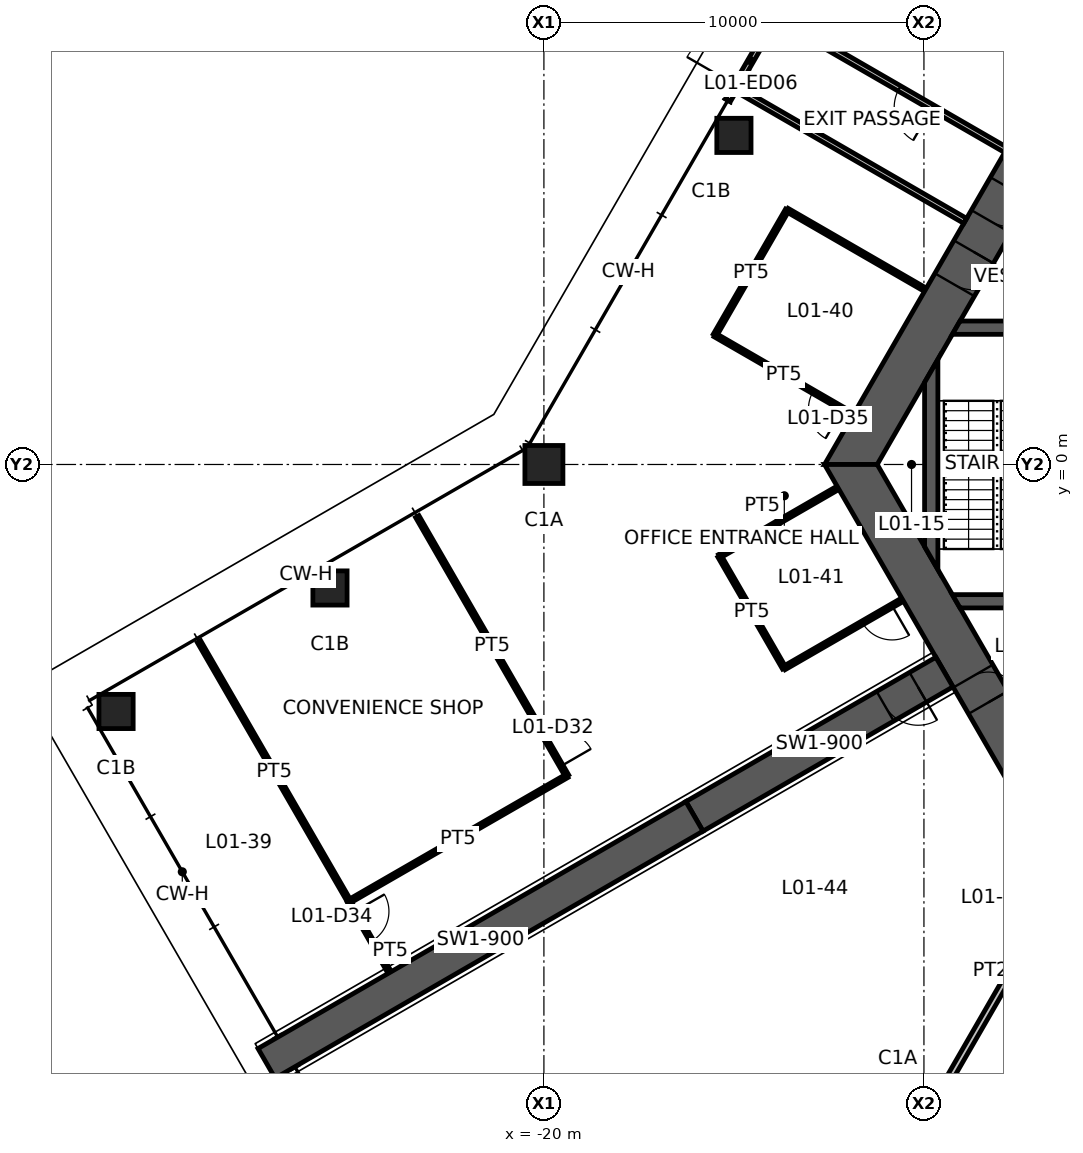
"""IFC4 building model, lengths in metres.
Left out: names, types, materials, properties, quantities, classifications, styles, units other than length and angle.
Written with IfcOpenShell. Run it as: python <this file> out.ifc"""

import sys

from ifc_helpers import new_model, si_unit, direction, frame, frame_2d, origin, origin_2d, place, context, subcontext, project, spatial, polyline, rectangle, hollow_rectangle, outline, extrude, element, fill, save


model = new_model("IFC4")
c1 = context("Model", 3, precision=1e-05, world=origin(), true_north=direction((0.0, 1.0)))
c2 = subcontext(c1, "Body", "Model", "MODEL_VIEW")
j1 = project(units=[si_unit("LENGTHUNIT", "METRE"), si_unit("PLANEANGLEUNIT", "RADIAN")], contexts=[c1])
p1 = place(None, origin())
s1 = spatial("IfcSite", under=j1, at=p1, CompositionType="ELEMENT")
p2 = place(p1, origin())
s2 = spatial("IfcBuilding", under=s1, at=p2, CompositionType="ELEMENT")
p3 = place(p2, origin())
s3 = spatial("IfcBuildingStorey", under=s2, at=p3, CompositionType="ELEMENT", Elevation=0.0)
p4 = place(p3, frame((-20.0, 0.0, 0.0), z_axis=(0.0, 0.0, 1.0), x_axis=(1.0, 0.0, 0.0)))
e1 = element("IfcColumn", 1, at=p4, inside=s3, PredefinedType="COLUMN", context=c2, shape_type="SweptSolid", body=[
    extrude(hollow_rectangle(XDim=1.0, YDim=1.0, WallThickness=0.06, at=origin_2d()), origin(), (0.0, 0.0, 1.0), 5.5),
])
for number, where, z_axis, x_axis in (
    (2, (-15.0, 8.66, 0.0), (0.0, 0.0, 1.0), (1.0, 0.0, 0.0)),
    (3, (-25.629, -3.25, 0.0), (0.0, 0.0, 1.0), (1.0, 0.0, 0.0)),
    (4, (-31.258, -6.5, 0.0), (0.0, 0.0, 1.0), (1.0, 0.0, 0.0)),
):
    element("IfcColumn", number, at=place(p3, frame(where, z_axis=z_axis, x_axis=x_axis)), inside=s3, PredefinedType="COLUMN", context=c2, shape_type="SweptSolid", body=[
        extrude(hollow_rectangle(XDim=0.9, YDim=0.9, WallThickness=0.05, at=origin_2d()), origin(), (0.0, 0.0, 1.0), 5.5),
    ])
p5 = place(p3, frame((-5.961, 10.325, 0.0), z_axis=(0.0, 0.0, 1.0), x_axis=(-0.500004296715, -0.866022923061, 0.0)))
e5 = element("IfcWall", 5, at=p5, inside=s3, PredefinedType="SHEAR", context=c2, shape_type="SweptSolid", body=[
    extrude(outline(polyline([(-0.346, -0.6), (3.541, -0.6), (4.541, -0.6), (5.461, -0.6), (6.461, -0.6), (12.269, -0.6), (11.576, 0.6), (6.461, 0.6), (5.461, 0.6), (4.541, 0.6), (3.541, 0.6), (0.346, 0.6), (-0.346, -0.6)])), origin(), (0.0, 0.0, 1.0), 5.5),
])
p6 = place(p5, frame((3.541, 0.0, 0.0)))
e6 = element("IfcOpeningElement", 6, at=p6, cuts=e5, PredefinedType="OPENING", context=c2, shape_type="SweptSolid", body=[
    extrude(rectangle(XDim=1.0, YDim=2.1, at=frame_2d((0.5, 1.05))), frame((0.0, 0.61, 0.0), z_axis=(0.0, -1.0, 0.0), x_axis=(1.0, 0.0, 0.0)), (0.0, 0.0, 1.0), 1.22),
])
p7 = place(p5, frame((5.461, 0.0, 0.0)))
e7 = element("IfcOpeningElement", 7, at=p7, cuts=e5, PredefinedType="OPENING", context=c2, shape_type="SweptSolid", body=[
    extrude(rectangle(XDim=1.0, YDim=2.1, at=frame_2d((0.5, 1.05))), frame((0.0, 0.61, 0.0), z_axis=(0.0, -1.0, 0.0), x_axis=(1.0, 0.0, 0.0)), (0.0, 0.0, 1.0), 1.22),
])
p8 = place(p3, frame((-11.922, 0.0, 0.0), z_axis=(0.0, 0.0, 1.0), x_axis=(0.500004296715, -0.866022923061, 0.0)))
e8 = element("IfcWall", 8, at=p8, inside=s3, PredefinedType="SHEAR", context=c2, shape_type="SweptSolid", body=[
    extrude(outline(polyline([(-0.346, -0.6), (6.431, -0.6), (7.231, -0.6), (12.269, -0.6), (11.576, 0.6), (7.231, 0.6), (6.431, 0.6), (0.346, 0.6), (-0.346, -0.6)])), origin(), (0.0, 0.0, 1.0), 5.5),
])
p9 = place(p8, frame((6.431, 0.0, 0.0)))
e9 = element("IfcOpeningElement", 9, at=p9, cuts=e8, PredefinedType="OPENING", context=c2, shape_type="SweptSolid", body=[
    extrude(rectangle(XDim=0.8, YDim=2.1, at=frame_2d((0.4, 1.05))), frame((0.0, 0.61, 0.0), z_axis=(0.0, -1.0, 0.0), x_axis=(1.0, 0.0, 0.0)), (0.0, 0.0, 1.0), 1.22),
])
p10 = place(p3, frame((-9.461, -5.462, 0.0), z_axis=(0.0, 0.0, 1.0), x_axis=(-0.866019116917, -0.500010889016, 0.0)))
e10 = element("IfcWall", 10, at=p10, inside=s3, PredefinedType="SHEAR", context=c2, shape_type="SweptSolid", body=[
    extrude(rectangle(XDim=7.595, YDim=0.9, at=frame_2d((3.798, 0.0))), origin(), (0.0, 0.0, 1.0), 5.5),
])
p11 = place(p10, frame((0.8, 0.0, 0.0)))
e11 = element("IfcOpeningElement", 11, at=p11, cuts=e10, PredefinedType="OPENING", context=c2, shape_type="SweptSolid", body=[
    extrude(rectangle(XDim=1.0, YDim=2.1, at=frame_2d((0.5, 1.05))), frame((0.0, 0.46, 0.0), z_axis=(0.0, -1.0, 0.0), x_axis=(1.0, 0.0, 0.0)), (0.0, 0.0, 1.0), 0.92),
])
p12 = place(p3, frame((-16.039, -9.26, 0.0), z_axis=(0.0, 0.0, 1.0), x_axis=(-0.866024837091, -0.50000098154, 0.0)))
e12 = element("IfcWall", 12, at=p12, inside=s3, PredefinedType="SHEAR", context=c2, shape_type="SweptSolid", body=[
    extrude(rectangle(XDim=13.0, YDim=0.9, at=frame_2d((6.5, 0.0))), origin(), (0.0, 0.0, 1.0), 5.5),
])
p13 = place(p3, frame((-15.16, 9.584, 0.0), z_axis=(0.0, 0.0, 1.0), x_axis=(0.499957262057, 0.866050077142, 0.0)))
e13 = element("IfcWall", 13, at=p13, inside=s3, PredefinedType="STANDARD", context=c2, shape_type="SweptSolid", body=[
    extrude(rectangle(XDim=2.4, YDim=0.15, at=frame_2d((1.2, 0.0))), origin(), (0.0, 0.0, 1.0), 5.5),
])
p14 = place(p13, frame((0.45, 0.0, 0.0)))
e14 = element("IfcOpeningElement", 14, at=p14, cuts=e13, PredefinedType="OPENING", context=c2, shape_type="SweptSolid", body=[
    extrude(rectangle(XDim=1.5, YDim=2.4, at=frame_2d((0.75, 1.2))), frame((0.0, 0.085, 0.0), z_axis=(0.0, -1.0, 0.0), x_axis=(1.0, 0.0, 0.0)), (0.0, 0.0, 1.0), 0.17),
])
p15 = place(p3, frame((-9.151, 3.6, 0.0), z_axis=(0.0, 0.0, 1.0), x_axis=(1.0, 0.0, 0.0)))
e15 = element("IfcWall", 15, at=p15, inside=s3, PredefinedType="SHEAR", context=c2, shape_type="SweptSolid", body=[
    extrude(outline(polyline([(-0.101, -0.175), (3.151, -0.175), (4.151, -0.175), (5.551, -0.175), (6.651, -0.175), (7.726, -0.175), (7.726, 0.175), (6.651, 0.175), (5.551, 0.175), (4.151, 0.175), (3.151, 0.175), (0.101, 0.175), (-0.101, -0.175)])), origin(), (0.0, 0.0, 1.0), 5.5),
])
p16 = place(p15, frame((3.151, 0.0, 0.0)))
e16 = element("IfcOpeningElement", 16, at=p16, cuts=e15, PredefinedType="OPENING", context=c2, shape_type="SweptSolid", body=[
    extrude(rectangle(XDim=1.0, YDim=2.1, at=frame_2d((0.5, 1.05))), frame((0.0, 0.185, 0.0), z_axis=(0.0, -1.0, 0.0), x_axis=(1.0, 0.0, 0.0)), (0.0, 0.0, 1.0), 0.37),
])
p17 = place(p15, frame((5.551, 0.0, 0.0)))
e17 = element("IfcOpeningElement", 17, at=p17, cuts=e15, PredefinedType="OPENING", context=c2, shape_type="SweptSolid", body=[
    extrude(rectangle(XDim=1.1, YDim=2.1, at=frame_2d((0.55, 1.05))), frame((0.0, 0.185, 0.0), z_axis=(0.0, -1.0, 0.0), x_axis=(1.0, 0.0, 0.0)), (0.0, 0.0, 1.0), 0.37),
])
p18 = place(p3, frame((-9.151, -3.6, 0.0), z_axis=(0.0, 0.0, 1.0), x_axis=(1.0, 0.0, 0.0)))
e18 = element("IfcWall", 18, at=p18, inside=s3, PredefinedType="SHEAR", context=c2, shape_type="SweptSolid", body=[
    extrude(outline(polyline([(0.101, -0.175), (3.001, -0.175), (4.301, -0.175), (5.551, -0.175), (6.651, -0.175), (7.726, -0.175), (7.726, 0.175), (6.651, 0.175), (5.551, 0.175), (4.301, 0.175), (3.001, 0.175), (-0.101, 0.175), (0.101, -0.175)])), origin(), (0.0, 0.0, 1.0), 5.5),
])
p19 = place(p18, frame((5.551, 0.0, 0.0)))
e19 = element("IfcOpeningElement", 19, at=p19, cuts=e18, PredefinedType="OPENING", context=c2, shape_type="SweptSolid", body=[
    extrude(rectangle(XDim=1.1, YDim=2.1, at=frame_2d((0.55, 1.05))), frame((0.0, 0.185, 0.0), z_axis=(0.0, -1.0, 0.0), x_axis=(1.0, 0.0, 0.0)), (0.0, 0.0, 1.0), 0.37),
])
p20 = place(p18, frame((3.001, 0.0, 0.0)))
e20 = element("IfcOpeningElement", 20, at=p20, cuts=e18, PredefinedType="OPENING", context=c2, shape_type="SweptSolid", body=[
    extrude(rectangle(XDim=1.3, YDim=2.1, at=frame_2d((0.65, 1.05))), frame((0.0, 0.185, 0.0), z_axis=(0.0, -1.0, 0.0), x_axis=(1.0, 0.0, 0.0)), (0.0, 0.0, 1.0), 0.37),
])
p21 = place(p3, frame((-9.808, -2.462, 0.0), z_axis=(0.0, 0.0, 1.0), x_axis=(0.0, 1.0, 0.0)))
e21 = element("IfcWall", 21, at=p21, inside=s3, PredefinedType="SHEAR", context=c2, shape_type="SweptSolid", body=[
    extrude(outline(polyline([(-0.303, -0.175), (5.228, -0.175), (4.621, 0.175), (0.303, 0.175), (-0.303, -0.175)])), origin(), (0.0, 0.0, 1.0), 5.5),
])
p22 = place(p3, frame((-6.035, 10.453, 0.0), z_axis=(0.0, 0.0, 1.0), x_axis=(-0.499993402427, 0.866029212861, 0.0)))
e22 = element("IfcWall", 22, at=p22, inside=s3, PredefinedType="PARTITIONING", context=c2, shape_type="SweptSolid", body=[
    extrude(outline(polyline([(-0.051, -0.087), (1.129, -0.087), (2.129, -0.087), (7.93, -0.087), (7.93, 0.087), (2.129, 0.087), (1.129, 0.087), (0.051, 0.087), (-0.051, -0.087)])), origin(), (0.0, 0.0, 1.0), 4.6),
])
p23 = place(p22, frame((1.129, 0.0, 0.0)))
e23 = element("IfcOpeningElement", 23, at=p23, cuts=e22, PredefinedType="OPENING", context=c2, shape_type="SweptSolid", body=[
    extrude(rectangle(XDim=1.0, YDim=2.1, at=frame_2d((0.5, 1.05))), frame((0.0, 0.098, 0.0), z_axis=(0.0, -1.0, 0.0), x_axis=(1.0, 0.0, 0.0)), (0.0, 0.0, 1.0), 0.195),
])
p24 = place(p3, frame((-6.035, -10.453, 0.0), z_axis=(0.0, 0.0, 1.0), x_axis=(-0.499993402427, -0.866029212861, 0.0)))
e24 = element("IfcWall", 24, at=p24, inside=s3, PredefinedType="PARTITIONING", context=c2, shape_type="SweptSolid", body=[
    extrude(outline(polyline([(-0.051, -0.087), (1.129, -0.087), (2.129, -0.087), (7.93, -0.087), (7.93, 0.087), (2.129, 0.087), (1.129, 0.087), (0.051, 0.087), (-0.051, -0.087)])), origin(), (0.0, 0.0, 1.0), 4.6),
])
p25 = place(p24, frame((1.129, 0.0, 0.0)))
e25 = element("IfcOpeningElement", 25, at=p25, cuts=e24, PredefinedType="OPENING", context=c2, shape_type="SweptSolid", body=[
    extrude(rectangle(XDim=1.0, YDim=2.1, at=frame_2d((0.5, 1.05))), frame((0.0, 0.098, 0.0), z_axis=(0.0, -1.0, 0.0), x_axis=(1.0, 0.0, 0.0)), (0.0, 0.0, 1.0), 0.195),
])
p26 = place(p3, frame((-25.12, -11.501, 0.0), z_axis=(0.0, 0.0, 1.0), x_axis=(-0.50060862307, 0.865673729825, 0.0)))
e26 = element("IfcWall", 26, at=p26, inside=s3, PredefinedType="PARTITIONING", context=c2, shape_type="SweptSolid", body=[
    extrude(rectangle(XDim=7.9, YDim=0.1, at=frame_2d((3.95, 0.0))), origin(), (0.0, 0.0, 1.0), 4.5),
])
p27 = place(p3, frame((-23.332, -1.37, 0.0), z_axis=(0.0, 0.0, 1.0), x_axis=(0.500021035396, -0.866013258652, 0.0)))
e27 = element("IfcWall", 27, at=p27, inside=s3, PredefinedType="PARTITIONING", context=c2, shape_type="SweptSolid", body=[
    extrude(rectangle(XDim=7.88, YDim=0.1, at=frame_2d((3.94, 0.0))), origin(), (0.0, 0.0, 1.0), 4.5),
])
p28 = place(p27, frame((6.68, 0.0, 0.0)))
e28 = element("IfcOpeningElement", 28, at=p28, cuts=e27, PredefinedType="OPENING", context=c2, shape_type="SweptSolid", body=[
    extrude(rectangle(XDim=0.9, YDim=2.1, at=frame_2d((0.45, 1.05))), frame((0.0, 0.06, 0.0), z_axis=(0.0, -1.0, 0.0), x_axis=(1.0, 0.0, 0.0)), (0.0, 0.0, 1.0), 0.12),
])
p29 = place(p3, frame((-19.392, -8.194, 0.0), z_axis=(0.0, 0.0, 1.0), x_axis=(-0.866327998015, -0.499475524781, 0.0)))
e29 = element("IfcWall", 29, at=p29, inside=s3, PredefinedType="PARTITIONING", context=c2, shape_type="SweptSolid", body=[
    extrude(rectangle(XDim=6.62, YDim=0.1, at=frame_2d((3.31, 0.0))), origin(), (0.0, 0.0, 1.0), 4.5),
])
p30 = place(p3, frame((-7.838, 8.274, 0.0), z_axis=(0.0, 0.0, 1.0), x_axis=(-0.866012988868, 0.50002150265, 0.0)))
e30 = element("IfcWall", 30, at=p30, inside=s3, PredefinedType="PARTITIONING", context=c2, shape_type="SweptSolid", body=[
    extrude(rectangle(XDim=6.926, YDim=0.15, at=frame_2d((3.463, 0.0))), origin(), (0.0, 0.0, 1.0), 4.5),
])
p31 = place(p30, frame((2.246, 0.0, 0.0)))
e31 = element("IfcOpeningElement", 31, at=p31, cuts=e30, PredefinedType="OPENING", context=c2, shape_type="SweptSolid", body=[
    extrude(rectangle(XDim=1.0, YDim=2.1, at=frame_2d((0.5, 1.05))), frame((0.0, 0.085, 0.0), z_axis=(0.0, -1.0, 0.0), x_axis=(1.0, 0.0, 0.0)), (0.0, 0.0, 1.0), 0.17),
])
p32 = place(p3, frame((-8.914, 6.411, 0.0), z_axis=(0.0, 0.0, 1.0), x_axis=(-0.866025337903, 0.500000114109, 0.0)))
e32 = element("IfcWall", 32, at=p32, inside=s3, PredefinedType="PARTITIONING", context=c2, shape_type="SweptSolid", body=[
    extrude(rectangle(XDim=6.875, YDim=0.15, at=frame_2d((3.438, 0.0))), origin(), (0.0, 0.0, 1.0), 4.5),
])
p33 = place(p3, frame((-25.126, -11.5, 0.0), z_axis=(0.0, 0.0, 1.0), x_axis=(0.496175899628, -0.868222020354, 0.0)))
e33 = element("IfcWall", 33, at=p33, inside=s3, PredefinedType="PARTITIONING", context=c2, shape_type="SweptSolid", body=[
    extrude(rectangle(XDim=2.134, YDim=0.1, at=frame_2d((1.067, 0.0))), origin(), (0.0, 0.0, 1.0), 4.5),
])
p34 = place(p33, frame((0.3, 0.0, 0.0)))
e34 = element("IfcOpeningElement", 34, at=p34, cuts=e33, PredefinedType="OPENING", context=c2, shape_type="SweptSolid", body=[
    extrude(rectangle(XDim=0.9, YDim=2.1, at=frame_2d((0.45, 1.05))), frame((0.0, 0.06, 0.0), z_axis=(0.0, -1.0, 0.0), x_axis=(1.0, 0.0, 0.0)), (0.0, 0.0, 1.0), 0.12),
])
p35 = place(p3, frame((-15.499, 3.406, 0.0), z_axis=(0.0, 0.0, 1.0), x_axis=(0.499967155389, 0.866044365799, 0.0)))
e35 = element("IfcWall", 35, at=p35, inside=s3, PredefinedType="PARTITIONING", context=c2, shape_type="SweptSolid", body=[
    extrude(rectangle(XDim=3.8, YDim=0.1, at=frame_2d((1.9, 0.0))), origin(), (0.0, 0.0, 1.0), 4.5),
])
p36 = place(p3, frame((-13.599, 6.697, 0.0), z_axis=(0.0, 0.0, 1.0), x_axis=(0.866024134012, -0.500002199304, 0.0)))
e36 = element("IfcWall", 36, at=p36, inside=s3, PredefinedType="PARTITIONING", context=c2, shape_type="SweptSolid", body=[
    extrude(rectangle(XDim=4.18, YDim=0.1, at=frame_2d((2.09, 0.0))), origin(), (0.0, 0.0, 1.0), 4.5),
])
p37 = place(p3, frame((-11.879, 1.316, 0.0), z_axis=(0.0, 0.0, 1.0), x_axis=(-0.866034823405, 0.499983684383, 0.0)))
e37 = element("IfcWall", 37, at=p37, inside=s3, PredefinedType="PARTITIONING", context=c2, shape_type="SweptSolid", body=[
    extrude(rectangle(XDim=4.18, YDim=0.1, at=frame_2d((2.09, 0.0))), origin(), (0.0, 0.0, 1.0), 4.5),
])
p38 = place(p37, frame((0.3, 0.0, 0.0)))
e38 = element("IfcOpeningElement", 38, at=p38, cuts=e37, PredefinedType="OPENING", context=c2, shape_type="SweptSolid", body=[
    extrude(rectangle(XDim=0.9, YDim=2.1, at=frame_2d((0.45, 1.05))), frame((0.0, 0.06, 0.0), z_axis=(0.0, -1.0, 0.0), x_axis=(1.0, 0.0, 0.0)), (0.0, 0.0, 1.0), 0.12),
])
p39 = place(p3, frame((-15.379, -2.413, 0.0), z_axis=(0.0, 0.0, 1.0), x_axis=(0.866018643436, 0.500011709085, 0.0)))
e39 = element("IfcWall", 39, at=p39, inside=s3, PredefinedType="PARTITIONING", context=c2, shape_type="SweptSolid", body=[
    extrude(rectangle(XDim=3.58, YDim=0.1, at=frame_2d((1.79, 0.0))), origin(), (0.0, 0.0, 1.0), 4.5),
])
p40 = place(p3, frame((-13.679, -5.357, 0.0), z_axis=(0.0, 0.0, 1.0), x_axis=(-0.500008388397, 0.866020560687, 0.0)))
e40 = element("IfcWall", 40, at=p40, inside=s3, PredefinedType="PARTITIONING", context=c2, shape_type="SweptSolid", body=[
    extrude(rectangle(XDim=3.4, YDim=0.1, at=frame_2d((1.7, 0.0))), origin(), (0.0, 0.0, 1.0), 4.5),
])
p41 = place(p3, frame((-10.579, -3.567, 0.0), z_axis=(0.0, 0.0, 1.0), x_axis=(-0.866018643436, -0.500011709085, 0.0)))
e41 = element("IfcWall", 41, at=p41, inside=s3, PredefinedType="PARTITIONING", context=c2, shape_type="SweptSolid", body=[
    extrude(rectangle(XDim=3.58, YDim=0.1, at=frame_2d((1.79, 0.0))), origin(), (0.0, 0.0, 1.0), 4.5),
])
p42 = place(p41, frame((0.3, 0.0, 0.0)))
e42 = element("IfcOpeningElement", 42, at=p42, cuts=e41, PredefinedType="OPENING", context=c2, shape_type="SweptSolid", body=[
    extrude(rectangle(XDim=0.9, YDim=2.1, at=frame_2d((0.45, 1.05))), frame((0.0, 0.06, 0.0), z_axis=(0.0, -1.0, 0.0), x_axis=(1.0, 0.0, 0.0)), (0.0, 0.0, 1.0), 0.12),
])
p43 = place(p14, origin())
e43 = element("IfcDoor", 43, at=p43, inside=s3, OperationType="DOUBLE_DOOR_SINGLE_SWING", PredefinedType="DOOR", context=c2, shape_type="SweptSolid", body=[
    extrude(rectangle(XDim=1.5, YDim=2.4, at=frame_2d((0.75, 1.2))), frame((0.0, 0.025, 0.0), z_axis=(0.0, -1.0, 0.0), x_axis=(1.0, 0.0, 0.0)), (0.0, 0.0, 1.0), 0.05),
])
fill(e14, e43)
p44 = place(p9, origin())
e44 = element("IfcDoor", 44, at=p44, inside=s3, OperationType="SINGLE_SWING_RIGHT", PredefinedType="DOOR", context=c2, shape_type="SweptSolid", body=[
    extrude(rectangle(XDim=0.8, YDim=2.1, at=frame_2d((0.4, 1.05))), frame((0.0, 0.025, 0.0), z_axis=(0.0, -1.0, 0.0), x_axis=(1.0, 0.0, 0.0)), (0.0, 0.0, 1.0), 0.05),
])
fill(e9, e44)
p45 = place(p6, origin())
e45 = element("IfcDoor", 45, at=p45, inside=s3, OperationType="SINGLE_SWING_LEFT", PredefinedType="DOOR", context=c2, shape_type="SweptSolid", body=[
    extrude(rectangle(XDim=1.0, YDim=2.1, at=frame_2d((0.5, 1.05))), frame((0.0, 0.025, 0.0), z_axis=(0.0, -1.0, 0.0), x_axis=(1.0, 0.0, 0.0)), (0.0, 0.0, 1.0), 0.05),
])
fill(e6, e45)
p46 = place(p11, origin())
e46 = element("IfcDoor", 46, at=p46, inside=s3, OperationType="SINGLE_SWING_LEFT", PredefinedType="DOOR", context=c2, shape_type="SweptSolid", body=[
    extrude(rectangle(XDim=1.0, YDim=2.1, at=frame_2d((0.5, 1.05))), frame((0.0, 0.025, 0.0), z_axis=(0.0, -1.0, 0.0), x_axis=(1.0, 0.0, 0.0)), (0.0, 0.0, 1.0), 0.05),
])
fill(e11, e46)
p47 = place(p28, origin())
e47 = element("IfcDoor", 47, at=p47, inside=s3, OperationType="SINGLE_SWING_RIGHT", PredefinedType="DOOR", context=c2, shape_type="SweptSolid", body=[
    extrude(rectangle(XDim=0.9, YDim=2.1, at=frame_2d((0.45, 1.05))), frame((0.0, 0.025, 0.0), z_axis=(0.0, -1.0, 0.0), x_axis=(1.0, 0.0, 0.0)), (0.0, 0.0, 1.0), 0.05),
])
fill(e28, e47)
p48 = place(p31, origin())
e48 = element("IfcDoor", 48, at=p48, inside=s3, OperationType="SINGLE_SWING_LEFT", PredefinedType="DOOR", context=c2, shape_type="SweptSolid", body=[
    extrude(rectangle(XDim=1.0, YDim=2.1, at=frame_2d((0.5, 1.05))), frame((0.0, 0.025, 0.0), z_axis=(0.0, -1.0, 0.0), x_axis=(1.0, 0.0, 0.0)), (0.0, 0.0, 1.0), 0.05),
])
fill(e31, e48)
p49 = place(p34, origin())
e49 = element("IfcDoor", 49, at=p49, inside=s3, OperationType="SINGLE_SWING_LEFT", PredefinedType="DOOR", context=c2, shape_type="SweptSolid", body=[
    extrude(rectangle(XDim=0.9, YDim=2.1, at=frame_2d((0.45, 1.05))), frame((0.0, 0.025, 0.0), z_axis=(0.0, -1.0, 0.0), x_axis=(1.0, 0.0, 0.0)), (0.0, 0.0, 1.0), 0.05),
])
fill(e34, e49)
p50 = place(p38, origin())
e50 = element("IfcDoor", 50, at=p50, inside=s3, OperationType="SINGLE_SWING_LEFT", PredefinedType="DOOR", context=c2, shape_type="SweptSolid", body=[
    extrude(rectangle(XDim=0.9, YDim=2.1, at=frame_2d((0.45, 1.05))), frame((0.0, 0.025, 0.0), z_axis=(0.0, -1.0, 0.0), x_axis=(1.0, 0.0, 0.0)), (0.0, 0.0, 1.0), 0.05),
])
fill(e38, e50)
p51 = place(p42, origin())
e51 = element("IfcDoor", 51, at=p51, inside=s3, OperationType="SINGLE_SWING_LEFT", PredefinedType="DOOR", context=c2, shape_type="SweptSolid", body=[
    extrude(rectangle(XDim=0.9, YDim=2.1, at=frame_2d((0.45, 1.05))), frame((0.0, 0.025, 0.0), z_axis=(0.0, -1.0, 0.0), x_axis=(1.0, 0.0, 0.0)), (0.0, 0.0, 1.0), 0.05),
])
fill(e42, e51)
p52 = place(p7, origin())
e52 = element("IfcDoor", 52, at=p52, inside=s3, OperationType="SINGLE_SWING_LEFT", PredefinedType="DOOR", context=c2, shape_type="SweptSolid", body=[
    extrude(rectangle(XDim=1.0, YDim=2.1, at=frame_2d((0.5, 1.05))), frame((0.0, 0.025, 0.0), z_axis=(0.0, -1.0, 0.0), x_axis=(1.0, 0.0, 0.0)), (0.0, 0.0, 1.0), 0.05),
])
fill(e7, e52)
save(model, sys.argv[1])
